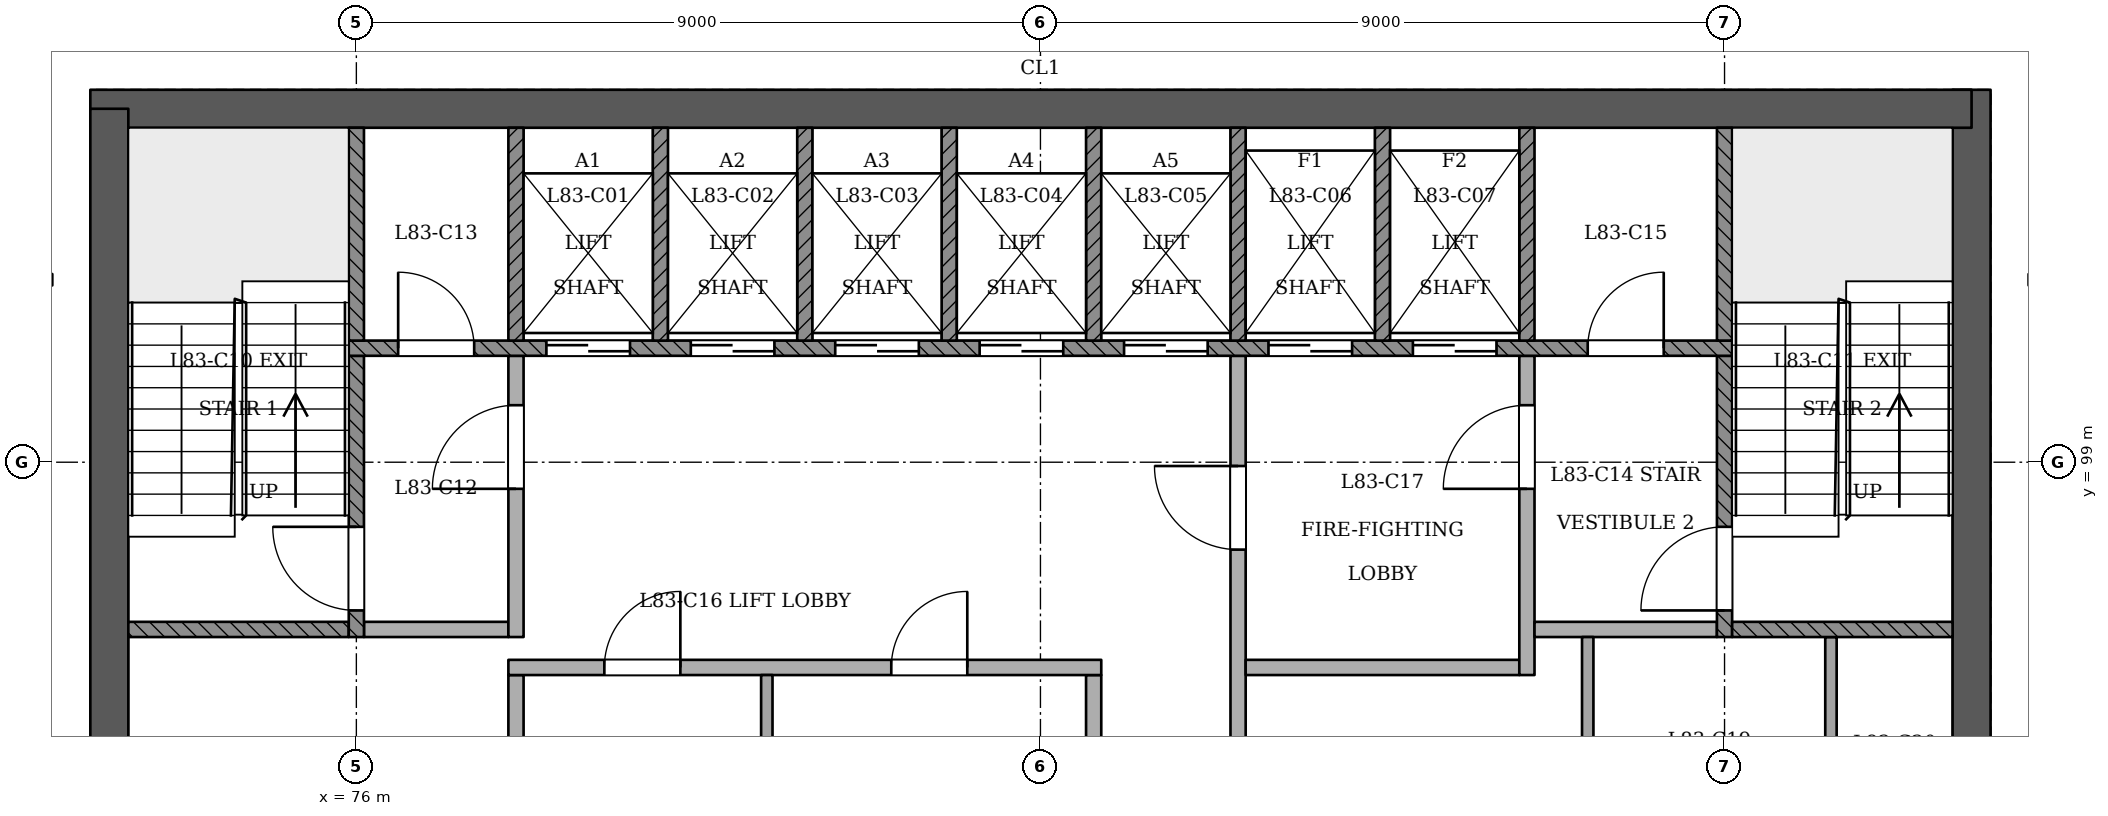
"""IFC4 building model, lengths in metres.
Left out: names, types, materials, properties, quantities, classifications, styles, units other than length and angle.
Written with IfcOpenShell. Run it as: python <this file> out.ifc"""

import sys

from ifc_helpers import new_model, si_unit, direction, frame, frame_2d, origin, place, context, subcontext, project, spatial, rectangle, extrude, element, fill, save


model = new_model("IFC4")
c1 = context("Model", 3, precision=1e-05, world=origin(), true_north=direction((0.0, 1.0)))
c2 = subcontext(c1, "Body", "Model", "MODEL_VIEW")
j1 = project(units=[si_unit("LENGTHUNIT", "METRE"), si_unit("PLANEANGLEUNIT", "RADIAN")], contexts=[c1])
p1 = place(None, origin())
s1 = spatial("IfcSite", under=j1, at=p1, CompositionType="ELEMENT")
p2 = place(p1, origin())
s2 = spatial("IfcBuilding", under=s1, at=p2, CompositionType="ELEMENT")
p3 = place(p2, frame((0.0, 0.0, 320.2)))
s3 = spatial("IfcBuildingStorey", under=s2, at=p3, CompositionType="ELEMENT", Elevation=320.2)
p4 = place(p3, frame((97.25, 93.15, 0.0), z_axis=(0.0, 0.0, 1.0), x_axis=(0.0, 1.0, 0.0)))
e1 = element("IfcWall", 1, at=p4, inside=s3, PredefinedType="SHEAR", context=c2, shape_type="SweptSolid", body=[
    extrude(rectangle(XDim=10.75, YDim=0.5, at=frame_2d((5.375, 0.0))), origin(), (0.0, 0.0, 1.0), 3.6),
])
p5 = place(p3, frame((97.25, 103.65, 0.0), z_axis=(0.0, 0.0, 1.0), x_axis=(-1.0, 0.0, 0.0)))
e2 = element("IfcWall", 2, at=p5, inside=s3, PredefinedType="SHEAR", context=c2, shape_type="SweptSolid", body=[
    extrude(rectangle(XDim=24.75, YDim=0.5, at=frame_2d((12.375, 0.0))), origin(), (0.0, 0.0, 1.0), 3.6),
])
p6 = place(p3, frame((72.75, 103.65, 0.0), z_axis=(0.0, 0.0, 1.0), x_axis=(0.0, -1.0, 0.0)))
e3 = element("IfcWall", 3, at=p6, inside=s3, PredefinedType="SHEAR", context=c2, shape_type="SweptSolid", body=[
    extrude(rectangle(XDim=10.75, YDim=0.5, at=frame_2d((5.375, 0.0))), origin(), (0.0, 0.0, 1.0), 3.6),
])
p7 = place(p3, frame((78.1, 93.4, 0.0), z_axis=(0.0, 0.0, 1.0), x_axis=(0.0, 1.0, 0.0)))
e4 = element("IfcWall", 4, at=p7, inside=s3, PredefinedType="PARTITIONING", context=c2, shape_type="SweptSolid", body=[
    extrude(rectangle(XDim=2.8, YDim=0.2, at=frame_2d((1.4, 0.0))), origin(), (0.0, 0.0, 1.0), 3.2),
])
p8 = place(p3, frame((81.4, 93.4, 0.0), z_axis=(0.0, 0.0, 1.0), x_axis=(0.0, 1.0, 0.0)))
e5 = element("IfcWall", 5, at=p8, inside=s3, PredefinedType="PARTITIONING", context=c2, shape_type="SweptSolid", body=[
    extrude(rectangle(XDim=2.8, YDim=0.15, at=frame_2d((1.4, 0.0))), origin(), (0.0, 0.0, 1.0), 3.2),
])
p9 = place(p3, frame((85.7, 93.4, 0.0), z_axis=(0.0, 0.0, 1.0), x_axis=(0.0, 1.0, 0.0)))
e6 = element("IfcWall", 6, at=p9, inside=s3, PredefinedType="PARTITIONING", context=c2, shape_type="SweptSolid", body=[
    extrude(rectangle(XDim=2.8, YDim=0.2, at=frame_2d((1.4, 0.0))), origin(), (0.0, 0.0, 1.0), 3.2),
])
p10 = place(p3, frame((87.6, 93.4, 0.0), z_axis=(0.0, 0.0, 1.0), x_axis=(0.0, 1.0, 0.0)))
e7 = element("IfcWall", 7, at=p10, inside=s3, PredefinedType="PARTITIONING", context=c2, shape_type="SweptSolid", body=[
    extrude(rectangle(XDim=7.0, YDim=0.2, at=frame_2d((3.5, 0.0))), origin(), (0.0, 0.0, 1.0), 3.2),
])
p11 = place(p10, frame((4.45, 0.0, 0.0)))
e8 = element("IfcOpeningElement", 8, at=p11, cuts=e7, PredefinedType="OPENING", context=c2, shape_type="SweptSolid", body=[
    extrude(rectangle(XDim=1.1, YDim=2.1, at=frame_2d((0.55, 1.05))), frame((0.0, 0.11, 0.0), z_axis=(0.0, -1.0, 0.0), x_axis=(1.0, 0.0, 0.0)), (0.0, 0.0, 1.0), 0.221),
])
for number, where, z_axis, x_axis in (
    (9, (92.2, 93.4, 0.0), (0.0, 0.0, 1.0), (0.0, 1.0, 0.0)),
    (10, (95.4, 93.4, 0.0), (0.0, 0.0, 1.0), (0.0, 1.0, 0.0)),
):
    element("IfcWall", number, at=place(p3, frame(where, z_axis=z_axis, x_axis=x_axis)), inside=s3, PredefinedType="PARTITIONING", context=c2, shape_type="SweptSolid", body=[
        extrude(rectangle(XDim=3.3, YDim=0.15, at=frame_2d((1.65, 0.0))), origin(), (0.0, 0.0, 1.0), 3.2),
    ])
p12 = place(p3, frame((78.0, 96.3, 0.0), z_axis=(0.0, 0.0, 1.0), x_axis=(1.0, 0.0, 0.0)))
e11 = element("IfcWall", 11, at=p12, inside=s3, PredefinedType="PARTITIONING", context=c2, shape_type="SweptSolid", body=[
    extrude(rectangle(XDim=7.8, YDim=0.2, at=frame_2d((3.9, 0.0))), origin(), (0.0, 0.0, 1.0), 3.2),
])
p13 = place(p12, frame((1.262, 0.0, 0.0)))
e12 = element("IfcOpeningElement", 12, at=p13, cuts=e11, PredefinedType="OPENING", context=c2, shape_type="SweptSolid", body=[
    extrude(rectangle(XDim=1.0, YDim=2.1, at=frame_2d((0.5, 1.05))), frame((0.0, 0.11, 0.0), z_axis=(0.0, -1.0, 0.0), x_axis=(1.0, 0.0, 0.0)), (0.0, 0.0, 1.0), 0.221),
])
p14 = place(p12, frame((5.038, 0.0, 0.0)))
e13 = element("IfcOpeningElement", 13, at=p14, cuts=e11, PredefinedType="OPENING", context=c2, shape_type="SweptSolid", body=[
    extrude(rectangle(XDim=1.0, YDim=2.1, at=frame_2d((0.5, 1.05))), frame((0.0, 0.11, 0.0), z_axis=(0.0, -1.0, 0.0), x_axis=(1.0, 0.0, 0.0)), (0.0, 0.0, 1.0), 0.221),
])
p15 = place(p3, frame((87.7, 96.3, 0.0), z_axis=(0.0, 0.0, 1.0), x_axis=(1.0, 0.0, 0.0)))
e14 = element("IfcWall", 14, at=p15, inside=s3, PredefinedType="PARTITIONING", context=c2, shape_type="SweptSolid", body=[
    extrude(rectangle(XDim=3.6, YDim=0.2, at=frame_2d((1.8, 0.0))), origin(), (0.0, 0.0, 1.0), 3.2),
])
p16 = place(p3, frame((91.4, 96.2, 0.0), z_axis=(0.0, 0.0, 1.0), x_axis=(0.0, 1.0, 0.0)))
e15 = element("IfcWall", 15, at=p16, inside=s3, PredefinedType="PARTITIONING", context=c2, shape_type="SweptSolid", body=[
    extrude(rectangle(XDim=4.2, YDim=0.2, at=frame_2d((2.1, 0.0))), origin(), (0.0, 0.0, 1.0), 3.2),
])
p17 = place(p16, frame((2.45, 0.0, 0.0)))
e16 = element("IfcOpeningElement", 16, at=p17, cuts=e15, PredefinedType="OPENING", context=c2, shape_type="SweptSolid", body=[
    extrude(rectangle(XDim=1.1, YDim=2.1, at=frame_2d((0.55, 1.05))), frame((0.0, 0.11, 0.0), z_axis=(0.0, -1.0, 0.0), x_axis=(1.0, 0.0, 0.0)), (0.0, 0.0, 1.0), 0.221),
])
p18 = place(p3, frame((73.0, 96.8, 0.0), z_axis=(0.0, 0.0, 1.0), x_axis=(1.0, 0.0, 0.0)))
e17 = element("IfcWall", 17, at=p18, inside=s3, PredefinedType="SOLIDWALL", context=c2, shape_type="SweptSolid", body=[
    extrude(rectangle(XDim=2.9, YDim=0.2, at=frame_2d((1.45, 0.0))), origin(), (0.0, 0.0, 1.0), 3.2),
])
p19 = place(p3, frame((76.0, 96.7, 0.0), z_axis=(0.0, 0.0, 1.0), x_axis=(0.0, 1.0, 0.0)))
e18 = element("IfcWall", 18, at=p19, inside=s3, PredefinedType="SOLIDWALL", context=c2, shape_type="SweptSolid", body=[
    extrude(rectangle(XDim=3.7, YDim=0.2, at=frame_2d((1.85, 0.0))), origin(), (0.0, 0.0, 1.0), 3.2),
])
p20 = place(p19, frame((0.35, 0.0, 0.0)))
e19 = element("IfcOpeningElement", 19, at=p20, cuts=e18, PredefinedType="OPENING", context=c2, shape_type="SweptSolid", body=[
    extrude(rectangle(XDim=1.1, YDim=2.1, at=frame_2d((0.55, 1.05))), frame((0.0, 0.11, 0.0), z_axis=(0.0, -1.0, 0.0), x_axis=(1.0, 0.0, 0.0)), (0.0, 0.0, 1.0), 0.221),
])
p21 = place(p3, frame((76.1, 96.8, 0.0), z_axis=(0.0, 0.0, 1.0), x_axis=(1.0, 0.0, 0.0)))
e20 = element("IfcWall", 20, at=p21, inside=s3, PredefinedType="PARTITIONING", context=c2, shape_type="SweptSolid", body=[
    extrude(rectangle(XDim=1.9, YDim=0.2, at=frame_2d((0.95, 0.0))), origin(), (0.0, 0.0, 1.0), 3.2),
])
p22 = place(p3, frame((78.1, 96.7, 0.0), z_axis=(0.0, 0.0, 1.0), x_axis=(0.0, 1.0, 0.0)))
e21 = element("IfcWall", 21, at=p22, inside=s3, PredefinedType="PARTITIONING", context=c2, shape_type="SweptSolid", body=[
    extrude(rectangle(XDim=3.7, YDim=0.2, at=frame_2d((1.85, 0.0))), origin(), (0.0, 0.0, 1.0), 3.2),
])
p23 = place(p22, frame((1.95, 0.0, 0.0)))
e22 = element("IfcOpeningElement", 22, at=p23, cuts=e21, PredefinedType="OPENING", context=c2, shape_type="SweptSolid", body=[
    extrude(rectangle(XDim=1.1, YDim=2.1, at=frame_2d((0.55, 1.05))), frame((0.0, 0.11, 0.0), z_axis=(0.0, -1.0, 0.0), x_axis=(1.0, 0.0, 0.0)), (0.0, 0.0, 1.0), 0.221),
])
p24 = place(p3, frame((91.5, 96.8, 0.0), z_axis=(0.0, 0.0, 1.0), x_axis=(1.0, 0.0, 0.0)))
e23 = element("IfcWall", 23, at=p24, inside=s3, PredefinedType="PARTITIONING", context=c2, shape_type="SweptSolid", body=[
    extrude(rectangle(XDim=2.4, YDim=0.2, at=frame_2d((1.2, 0.0))), origin(), (0.0, 0.0, 1.0), 3.2),
])
p25 = place(p3, frame((94.0, 96.7, 0.0), z_axis=(0.0, 0.0, 1.0), x_axis=(0.0, 1.0, 0.0)))
e24 = element("IfcWall", 24, at=p25, inside=s3, PredefinedType="SOLIDWALL", context=c2, shape_type="SweptSolid", body=[
    extrude(rectangle(XDim=3.7, YDim=0.2, at=frame_2d((1.85, 0.0))), origin(), (0.0, 0.0, 1.0), 3.2),
])
p26 = place(p25, frame((0.35, 0.0, 0.0)))
e25 = element("IfcOpeningElement", 25, at=p26, cuts=e24, PredefinedType="OPENING", context=c2, shape_type="SweptSolid", body=[
    extrude(rectangle(XDim=1.1, YDim=2.1, at=frame_2d((0.55, 1.05))), frame((0.0, 0.11, 0.0), z_axis=(0.0, -1.0, 0.0), x_axis=(1.0, 0.0, 0.0)), (0.0, 0.0, 1.0), 0.221),
])
p27 = place(p3, frame((94.1, 96.8, 0.0), z_axis=(0.0, 0.0, 1.0), x_axis=(1.0, 0.0, 0.0)))
e26 = element("IfcWall", 26, at=p27, inside=s3, PredefinedType="SOLIDWALL", context=c2, shape_type="SweptSolid", body=[
    extrude(rectangle(XDim=2.9, YDim=0.2, at=frame_2d((1.45, 0.0))), origin(), (0.0, 0.0, 1.0), 3.2),
])
p28 = place(p3, frame((75.9, 100.5, 0.0), z_axis=(0.0, 0.0, 1.0), x_axis=(1.0, 0.0, 0.0)))
e27 = element("IfcWall", 27, at=p28, inside=s3, PredefinedType="SOLIDWALL", context=c2, shape_type="SweptSolid", body=[
    extrude(rectangle(XDim=18.2, YDim=0.2, at=frame_2d((9.1, 0.0))), origin(), (0.0, 0.0, 1.0), 3.2),
])
p29 = place(p28, frame((2.6, 0.0, 0.0)))
e28 = element("IfcOpeningElement", 28, at=p29, cuts=e27, PredefinedType="OPENING", context=c2, shape_type="SweptSolid", body=[
    extrude(rectangle(XDim=1.1, YDim=2.1, at=frame_2d((0.55, 1.05))), frame((0.0, 0.11, 0.0), z_axis=(0.0, -1.0, 0.0), x_axis=(1.0, 0.0, 0.0)), (0.0, 0.0, 1.0), 0.221),
])
p30 = place(p28, frame((4.5, 0.0, 0.0)))
e29 = element("IfcOpeningElement", 29, at=p30, cuts=e27, PredefinedType="OPENING", context=c2, shape_type="SweptSolid", body=[
    extrude(rectangle(XDim=1.1, YDim=2.1, at=frame_2d((0.55, 1.05))), frame((0.0, 0.11, 0.0), z_axis=(0.0, -1.0, 0.0), x_axis=(1.0, 0.0, 0.0)), (0.0, 0.0, 1.0), 0.221),
])
p31 = place(p28, frame((6.4, 0.0, 0.0)))
e30 = element("IfcOpeningElement", 30, at=p31, cuts=e27, PredefinedType="OPENING", context=c2, shape_type="SweptSolid", body=[
    extrude(rectangle(XDim=1.1, YDim=2.1, at=frame_2d((0.55, 1.05))), frame((0.0, 0.11, 0.0), z_axis=(0.0, -1.0, 0.0), x_axis=(1.0, 0.0, 0.0)), (0.0, 0.0, 1.0), 0.221),
])
p32 = place(p28, frame((8.3, 0.0, 0.0)))
e31 = element("IfcOpeningElement", 31, at=p32, cuts=e27, PredefinedType="OPENING", context=c2, shape_type="SweptSolid", body=[
    extrude(rectangle(XDim=1.1, YDim=2.1, at=frame_2d((0.55, 1.05))), frame((0.0, 0.11, 0.0), z_axis=(0.0, -1.0, 0.0), x_axis=(1.0, 0.0, 0.0)), (0.0, 0.0, 1.0), 0.221),
])
p33 = place(p28, frame((10.2, 0.0, 0.0)))
e32 = element("IfcOpeningElement", 32, at=p33, cuts=e27, PredefinedType="OPENING", context=c2, shape_type="SweptSolid", body=[
    extrude(rectangle(XDim=1.1, YDim=2.1, at=frame_2d((0.55, 1.05))), frame((0.0, 0.11, 0.0), z_axis=(0.0, -1.0, 0.0), x_axis=(1.0, 0.0, 0.0)), (0.0, 0.0, 1.0), 0.221),
])
p34 = place(p28, frame((12.1, 0.0, 0.0)))
e33 = element("IfcOpeningElement", 33, at=p34, cuts=e27, PredefinedType="OPENING", context=c2, shape_type="SweptSolid", body=[
    extrude(rectangle(XDim=1.1, YDim=2.1, at=frame_2d((0.55, 1.05))), frame((0.0, 0.11, 0.0), z_axis=(0.0, -1.0, 0.0), x_axis=(1.0, 0.0, 0.0)), (0.0, 0.0, 1.0), 0.221),
])
p35 = place(p28, frame((14.0, 0.0, 0.0)))
e34 = element("IfcOpeningElement", 34, at=p35, cuts=e27, PredefinedType="OPENING", context=c2, shape_type="SweptSolid", body=[
    extrude(rectangle(XDim=1.1, YDim=2.1, at=frame_2d((0.55, 1.05))), frame((0.0, 0.11, 0.0), z_axis=(0.0, -1.0, 0.0), x_axis=(1.0, 0.0, 0.0)), (0.0, 0.0, 1.0), 0.221),
])
p36 = place(p28, frame((0.65, 0.0, 0.0)))
e35 = element("IfcOpeningElement", 35, at=p36, cuts=e27, PredefinedType="OPENING", context=c2, shape_type="SweptSolid", body=[
    extrude(rectangle(XDim=1.0, YDim=2.1, at=frame_2d((0.5, 1.05))), frame((0.0, 0.11, 0.0), z_axis=(0.0, -1.0, 0.0), x_axis=(1.0, 0.0, 0.0)), (0.0, 0.0, 1.0), 0.221),
])
p37 = place(p28, frame((16.3, 0.0, 0.0)))
e36 = element("IfcOpeningElement", 36, at=p37, cuts=e27, PredefinedType="OPENING", context=c2, shape_type="SweptSolid", body=[
    extrude(rectangle(XDim=1.0, YDim=2.1, at=frame_2d((0.5, 1.05))), frame((0.0, 0.11, 0.0), z_axis=(0.0, -1.0, 0.0), x_axis=(1.0, 0.0, 0.0)), (0.0, 0.0, 1.0), 0.221),
])
for number, where, z_axis, x_axis in (
    (37, (76.0, 100.6, 0.0), (0.0, 0.0, 1.0), (0.0, 1.0, 0.0)),
    (38, (78.1, 100.6, 0.0), (0.0, 0.0, 1.0), (0.0, 1.0, 0.0)),
    (39, (80.0, 100.6, 0.0), (0.0, 0.0, 1.0), (0.0, 1.0, 0.0)),
    (40, (81.9, 100.6, 0.0), (0.0, 0.0, 1.0), (0.0, 1.0, 0.0)),
    (41, (83.8, 100.6, 0.0), (0.0, 0.0, 1.0), (0.0, 1.0, 0.0)),
    (42, (85.7, 100.6, 0.0), (0.0, 0.0, 1.0), (0.0, 1.0, 0.0)),
    (43, (87.6, 100.6, 0.0), (0.0, 0.0, 1.0), (0.0, 1.0, 0.0)),
    (44, (89.5, 100.6, 0.0), (0.0, 0.0, 1.0), (0.0, 1.0, 0.0)),
    (45, (91.4, 100.6, 0.0), (0.0, 0.0, 1.0), (0.0, 1.0, 0.0)),
    (46, (94.0, 100.6, 0.0), (0.0, 0.0, 1.0), (0.0, 1.0, 0.0)),
):
    element("IfcWall", number, at=place(p3, frame(where, z_axis=z_axis, x_axis=x_axis)), inside=s3, PredefinedType="SOLIDWALL", context=c2, shape_type="SweptSolid", body=[
        extrude(rectangle(XDim=2.8, YDim=0.2, at=frame_2d((1.4, 0.0))), origin(), (0.0, 0.0, 1.0), 3.2),
    ])
p38 = place(p29, origin())
e47 = element("IfcDoor", 47, at=p38, inside=s3, OperationType="SLIDING_TO_RIGHT", PredefinedType="NOTDEFINED", context=c2, shape_type="SweptSolid", body=[
    extrude(rectangle(XDim=1.1, YDim=2.1, at=frame_2d((0.55, 1.05))), frame((0.0, 0.025, 0.0), z_axis=(0.0, -1.0, 0.0), x_axis=(1.0, 0.0, 0.0)), (0.0, 0.0, 1.0), 0.05),
])
fill(e28, e47)
p39 = place(p30, origin())
e48 = element("IfcDoor", 48, at=p39, inside=s3, OperationType="SLIDING_TO_LEFT", PredefinedType="NOTDEFINED", context=c2, shape_type="SweptSolid", body=[
    extrude(rectangle(XDim=1.1, YDim=2.1, at=frame_2d((0.55, 1.05))), frame((0.0, 0.025, 0.0), z_axis=(0.0, -1.0, 0.0), x_axis=(1.0, 0.0, 0.0)), (0.0, 0.0, 1.0), 0.05),
])
fill(e29, e48)
p40 = place(p31, origin())
e49 = element("IfcDoor", 49, at=p40, inside=s3, OperationType="SLIDING_TO_RIGHT", PredefinedType="NOTDEFINED", context=c2, shape_type="SweptSolid", body=[
    extrude(rectangle(XDim=1.1, YDim=2.1, at=frame_2d((0.55, 1.05))), frame((0.0, 0.025, 0.0), z_axis=(0.0, -1.0, 0.0), x_axis=(1.0, 0.0, 0.0)), (0.0, 0.0, 1.0), 0.05),
])
fill(e30, e49)
p41 = place(p32, origin())
e50 = element("IfcDoor", 50, at=p41, inside=s3, OperationType="SLIDING_TO_LEFT", PredefinedType="NOTDEFINED", context=c2, shape_type="SweptSolid", body=[
    extrude(rectangle(XDim=1.1, YDim=2.1, at=frame_2d((0.55, 1.05))), frame((0.0, 0.025, 0.0), z_axis=(0.0, -1.0, 0.0), x_axis=(1.0, 0.0, 0.0)), (0.0, 0.0, 1.0), 0.05),
])
fill(e31, e50)
p42 = place(p33, origin())
e51 = element("IfcDoor", 51, at=p42, inside=s3, OperationType="SLIDING_TO_RIGHT", PredefinedType="NOTDEFINED", context=c2, shape_type="SweptSolid", body=[
    extrude(rectangle(XDim=1.1, YDim=2.1, at=frame_2d((0.55, 1.05))), frame((0.0, 0.025, 0.0), z_axis=(0.0, -1.0, 0.0), x_axis=(1.0, 0.0, 0.0)), (0.0, 0.0, 1.0), 0.05),
])
fill(e32, e51)
p43 = place(p34, origin())
e52 = element("IfcDoor", 52, at=p43, inside=s3, OperationType="SLIDING_TO_RIGHT", PredefinedType="NOTDEFINED", context=c2, shape_type="SweptSolid", body=[
    extrude(rectangle(XDim=1.1, YDim=2.1, at=frame_2d((0.55, 1.05))), frame((0.0, 0.025, 0.0), z_axis=(0.0, -1.0, 0.0), x_axis=(1.0, 0.0, 0.0)), (0.0, 0.0, 1.0), 0.05),
])
fill(e33, e52)
p44 = place(p35, origin())
e53 = element("IfcDoor", 53, at=p44, inside=s3, OperationType="SLIDING_TO_LEFT", PredefinedType="NOTDEFINED", context=c2, shape_type="SweptSolid", body=[
    extrude(rectangle(XDim=1.1, YDim=2.1, at=frame_2d((0.55, 1.05))), frame((0.0, 0.025, 0.0), z_axis=(0.0, -1.0, 0.0), x_axis=(1.0, 0.0, 0.0)), (0.0, 0.0, 1.0), 0.05),
])
fill(e34, e53)
p45 = place(p20, origin())
e54 = element("IfcDoor", 54, at=p45, inside=s3, OperationType="SINGLE_SWING_RIGHT", PredefinedType="NOTDEFINED", context=c2, shape_type="SweptSolid", body=[
    extrude(rectangle(XDim=1.1, YDim=2.1, at=frame_2d((0.55, 1.05))), frame((0.0, 0.025, 0.0), z_axis=(0.0, -1.0, 0.0), x_axis=(1.0, 0.0, 0.0)), (0.0, 0.0, 1.0), 0.05),
])
fill(e19, e54)
p46 = place(p26, origin())
e55 = element("IfcDoor", 55, at=p46, inside=s3, OperationType="SINGLE_SWING_LEFT", PredefinedType="NOTDEFINED", context=c2, shape_type="SweptSolid", body=[
    extrude(rectangle(XDim=1.1, YDim=2.1, at=frame_2d((0.55, 1.05))), frame((0.0, 0.025, 0.0), z_axis=(0.0, -1.0, 0.0), x_axis=(1.0, 0.0, 0.0)), (0.0, 0.0, 1.0), 0.05),
])
fill(e25, e55)
p47 = place(p23, origin())
e56 = element("IfcDoor", 56, at=p47, inside=s3, OperationType="SINGLE_SWING_LEFT", PredefinedType="NOTDEFINED", context=c2, shape_type="SweptSolid", body=[
    extrude(rectangle(XDim=1.1, YDim=2.1, at=frame_2d((0.55, 1.05))), frame((0.0, 0.025, 0.0), z_axis=(0.0, -1.0, 0.0), x_axis=(1.0, 0.0, 0.0)), (0.0, 0.0, 1.0), 0.05),
])
fill(e22, e56)
p48 = place(p11, origin())
e57 = element("IfcDoor", 57, at=p48, inside=s3, OperationType="SINGLE_SWING_RIGHT", PredefinedType="NOTDEFINED", context=c2, shape_type="SweptSolid", body=[
    extrude(rectangle(XDim=1.1, YDim=2.1, at=frame_2d((0.55, 1.05))), frame((0.0, 0.025, 0.0), z_axis=(0.0, -1.0, 0.0), x_axis=(1.0, 0.0, 0.0)), (0.0, 0.0, 1.0), 0.05),
])
fill(e8, e57)
p49 = place(p17, origin())
e58 = element("IfcDoor", 58, at=p49, inside=s3, OperationType="SINGLE_SWING_LEFT", PredefinedType="NOTDEFINED", context=c2, shape_type="SweptSolid", body=[
    extrude(rectangle(XDim=1.1, YDim=2.1, at=frame_2d((0.55, 1.05))), frame((0.0, 0.025, 0.0), z_axis=(0.0, -1.0, 0.0), x_axis=(1.0, 0.0, 0.0)), (0.0, 0.0, 1.0), 0.05),
])
fill(e16, e58)
p50 = place(p36, origin())
e59 = element("IfcDoor", 59, at=p50, inside=s3, OperationType="SINGLE_SWING_LEFT", PredefinedType="NOTDEFINED", context=c2, shape_type="SweptSolid", body=[
    extrude(rectangle(XDim=1.0, YDim=2.1, at=frame_2d((0.5, 1.05))), frame((0.0, 0.025, 0.0), z_axis=(0.0, -1.0, 0.0), x_axis=(1.0, 0.0, 0.0)), (0.0, 0.0, 1.0), 0.05),
])
fill(e35, e59)
p51 = place(p37, origin())
e60 = element("IfcDoor", 60, at=p51, inside=s3, OperationType="SINGLE_SWING_RIGHT", PredefinedType="NOTDEFINED", context=c2, shape_type="SweptSolid", body=[
    extrude(rectangle(XDim=1.0, YDim=2.1, at=frame_2d((0.5, 1.05))), frame((0.0, 0.025, 0.0), z_axis=(0.0, -1.0, 0.0), x_axis=(1.0, 0.0, 0.0)), (0.0, 0.0, 1.0), 0.05),
])
fill(e36, e60)
p52 = place(p13, origin())
e61 = element("IfcDoor", 61, at=p52, inside=s3, OperationType="SINGLE_SWING_RIGHT", PredefinedType="NOTDEFINED", context=c2, shape_type="SweptSolid", body=[
    extrude(rectangle(XDim=1.0, YDim=2.1, at=frame_2d((0.5, 1.05))), frame((0.0, 0.025, 0.0), z_axis=(0.0, -1.0, 0.0), x_axis=(1.0, 0.0, 0.0)), (0.0, 0.0, 1.0), 0.05),
])
fill(e12, e61)
p53 = place(p14, origin())
e62 = element("IfcDoor", 62, at=p53, inside=s3, OperationType="SINGLE_SWING_RIGHT", PredefinedType="NOTDEFINED", context=c2, shape_type="SweptSolid", body=[
    extrude(rectangle(XDim=1.0, YDim=2.1, at=frame_2d((0.5, 1.05))), frame((0.0, 0.025, 0.0), z_axis=(0.0, -1.0, 0.0), x_axis=(1.0, 0.0, 0.0)), (0.0, 0.0, 1.0), 0.05),
])
fill(e13, e62)
save(model, sys.argv[1])
